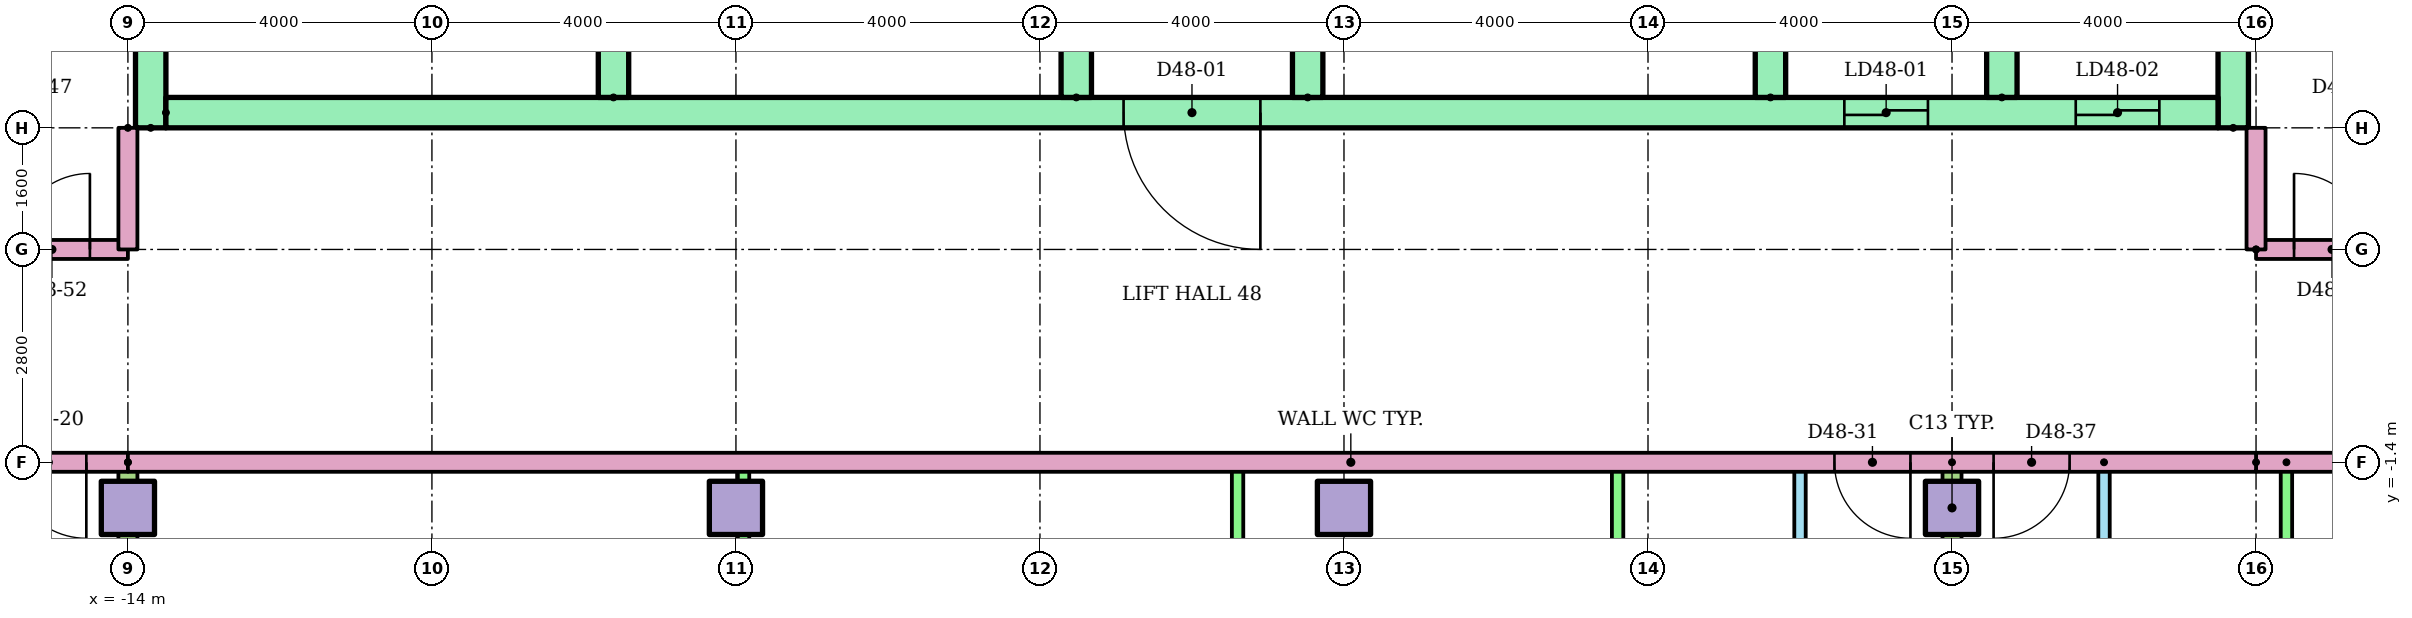
"""IFC4 building model, lengths in metres.
Left out: names, types, materials, properties, quantities, classifications, styles, units other than length and angle.
Written with IfcOpenShell. Run it as: python <this file> out.ifc"""

import sys

from ifc_helpers import new_model, si_unit, direction, frame, frame_2d, origin, origin_2d, place, context, subcontext, project, spatial, rectangle, extrude, element, fill, save


model = new_model("IFC4")
c1 = context("Model", 3, precision=1e-05, world=origin(), true_north=direction((0.0, 1.0)))
c2 = subcontext(c1, "Body", "Model", "MODEL_VIEW")
j1 = project(units=[si_unit("LENGTHUNIT", "METRE"), si_unit("PLANEANGLEUNIT", "RADIAN")], contexts=[c1])
p1 = place(None, origin())
s1 = spatial("IfcSite", under=j1, at=p1, CompositionType="ELEMENT")
p2 = place(p1, origin())
s2 = spatial("IfcBuilding", under=s1, at=p2, CompositionType="ELEMENT")
p3 = place(p2, frame((0.0, 0.0, 184.5)))
s3 = spatial("IfcBuildingStorey", under=s2, at=p3, CompositionType="ELEMENT", Elevation=184.5)
for number, where in (
    (1, (-14.0, -2.0, 0.0)),
    (2, (-6.0, -2.0, 0.0)),
    (3, (2.0, -2.0, 0.0)),
    (4, (10.0, -2.0, 0.0)),
):
    element("IfcColumn", number, at=place(p3, frame(where)), inside=s3, PredefinedType="COLUMN", context=c2, shape_type="SweptSolid", body=[
        extrude(rectangle(XDim=0.7, YDim=0.7, at=origin_2d()), origin(), (0.0, 0.0, 1.0), 3.2),
    ])
for number, where, z_axis, x_axis in (
    (5, (-13.7, 3.0, 0.0), (0.0, 0.0, 1.0), (0.0, 1.0, 0.0)),
    (6, (13.7, 3.0, 0.0), (0.0, 0.0, 1.0), (0.0, 1.0, 0.0)),
):
    element("IfcWall", number, at=place(p3, frame(where, z_axis=z_axis, x_axis=x_axis)), inside=s3, PredefinedType="SHEAR", context=c2, shape_type="SweptSolid", body=[
        extrude(rectangle(XDim=17.0, YDim=0.4, at=frame_2d((8.5, 0.0))), origin(), (0.0, 0.0, 1.0), 2.92),
    ])
p4 = place(p3, frame((-13.5, 3.2, 0.0)))
e7 = element("IfcWall", 7, at=p4, inside=s3, PredefinedType="SHEAR", context=c2, shape_type="SweptSolid", body=[
    extrude(rectangle(XDim=27.0, YDim=0.4, at=frame_2d((13.5, 0.0))), origin(), (0.0, 0.0, 1.0), 2.92),
])
p5 = place(p4, frame((22.083, 0.0, 0.0)))
e8 = element("IfcOpeningElement", 8, at=p5, cuts=e7, PredefinedType="OPENING", context=c2, shape_type="SweptSolid", body=[
    extrude(rectangle(XDim=1.1, YDim=2.1, at=frame_2d((0.55, 1.05))), frame((0.0, 0.21, 0.0), z_axis=(0.0, -1.0, 0.0), x_axis=(1.0, 0.0, 0.0)), (0.0, 0.0, 1.0), 0.42),
])
p6 = place(p4, frame((25.128, 0.0, 0.0)))
e9 = element("IfcOpeningElement", 9, at=p6, cuts=e7, PredefinedType="OPENING", context=c2, shape_type="SweptSolid", body=[
    extrude(rectangle(XDim=1.1, YDim=2.1, at=frame_2d((0.55, 1.05))), frame((0.0, 0.21, 0.0), z_axis=(0.0, -1.0, 0.0), x_axis=(1.0, 0.0, 0.0)), (0.0, 0.0, 1.0), 0.42),
])
p7 = place(p4, frame((12.6, 0.0, 0.0)))
e10 = element("IfcOpeningElement", 10, at=p7, cuts=e7, PredefinedType="OPENING", context=c2, shape_type="SweptSolid", body=[
    extrude(rectangle(XDim=1.8, YDim=2.1, at=frame_2d((0.9, 1.05))), frame((0.0, 0.21, 0.0), z_axis=(0.0, -1.0, 0.0), x_axis=(1.0, 0.0, 0.0)), (0.0, 0.0, 1.0), 0.42),
])
for number, where, z_axis, x_axis in (
    (11, (-7.611, 3.4, 0.0), (0.0, 0.0, 1.0), (0.0, 1.0, 0.0)),
    (12, (-1.522, 3.4, 0.0), (0.0, 0.0, 1.0), (0.0, 1.0, 0.0)),
    (13, (1.522, 3.4, 0.0), (0.0, 0.0, 1.0), (0.0, 1.0, 0.0)),
    (14, (7.611, 3.4, 0.0), (0.0, 0.0, 1.0), (0.0, 1.0, 0.0)),
    (15, (10.656, 3.4, 0.0), (0.0, 0.0, 1.0), (0.0, 1.0, 0.0)),
):
    element("IfcWall", number, at=place(p3, frame(where, z_axis=z_axis, x_axis=x_axis)), inside=s3, PredefinedType="SHEAR", context=c2, shape_type="SweptSolid", body=[
        extrude(rectangle(XDim=3.0, YDim=0.4, at=frame_2d((1.5, 0.0))), origin(), (0.0, 0.0, 1.0), 2.92),
    ])
p8 = place(p3, frame((8.0, -6.9, 0.0), z_axis=(0.0, 0.0, 1.0), x_axis=(0.0, 1.0, 0.0)))
e16 = element("IfcWall", 16, at=p8, inside=s3, PredefinedType="PARTITIONING", context=c2, shape_type="SweptSolid", body=[
    extrude(rectangle(XDim=5.5, YDim=0.15, at=frame_2d((2.75, 0.0))), origin(), (0.0, 0.0, 1.0), 2.4),
])
p9 = place(p8, frame((3.55, 0.0, 0.0)))
e17 = element("IfcOpeningElement", 17, at=p9, cuts=e16, PredefinedType="OPENING", context=c2, shape_type="SweptSolid", body=[
    extrude(rectangle(XDim=0.9, YDim=2.1, at=frame_2d((0.45, 1.05))), frame((0.0, 0.085, 0.0), z_axis=(0.0, -1.0, 0.0), x_axis=(1.0, 0.0, 0.0)), (0.0, 0.0, 1.0), 0.17),
])
p10 = place(p8, frame((0.85, 0.0, 0.0)))
e18 = element("IfcOpeningElement", 18, at=p10, cuts=e16, PredefinedType="OPENING", context=c2, shape_type="SweptSolid", body=[
    extrude(rectangle(XDim=0.8, YDim=2.1, at=frame_2d((0.4, 1.05))), frame((0.0, 0.085, 0.0), z_axis=(0.0, -1.0, 0.0), x_axis=(1.0, 0.0, 0.0)), (0.0, 0.0, 1.0), 0.17),
])
for number, where, z_axis, x_axis in (
    (19, (5.6, -6.9, 0.0), (0.0, 0.0, 1.0), (0.0, 1.0, 0.0)),
    (20, (0.6, -6.9, 0.0), (0.0, 0.0, 1.0), (0.0, 1.0, 0.0)),
    (21, (-5.9, -6.9, 0.0), (0.0, 0.0, 1.0), (0.0, 1.0, 0.0)),
):
    element("IfcWall", number, at=place(p3, frame(where, z_axis=z_axis, x_axis=x_axis)), inside=s3, PredefinedType="PARTITIONING", context=c2, shape_type="SweptSolid", body=[
        extrude(rectangle(XDim=5.5, YDim=0.15, at=frame_2d((2.75, 0.0))), origin(), (0.0, 0.0, 1.0), 2.4),
    ])
p11 = place(p3, frame((-14.0, -1.4, 0.0), z_axis=(0.0, 0.0, 1.0), x_axis=(0.0, -1.0, 0.0)))
e22 = element("IfcWall", 22, at=p11, inside=s3, PredefinedType="PARTITIONING", context=c2, shape_type="SweptSolid", body=[
    extrude(rectangle(XDim=15.01, YDim=0.25, at=frame_2d((7.505, 0.0))), origin(), (0.0, 0.0, 1.0), 2.4),
])
p12 = place(p3, frame((12.0, -1.4, 0.0), z_axis=(0.0, 0.0, 1.0), x_axis=(0.0, -1.0, 0.0)))
e23 = element("IfcWall", 23, at=p12, inside=s3, PredefinedType="PARTITIONING", context=c2, shape_type="SweptSolid", body=[
    extrude(rectangle(XDim=5.5, YDim=0.15, at=frame_2d((2.75, 0.0))), origin(), (0.0, 0.0, 1.0), 2.4),
])
p13 = place(p12, frame((1.05, 0.0, 0.0)))
e24 = element("IfcOpeningElement", 24, at=p13, cuts=e23, PredefinedType="OPENING", context=c2, shape_type="SweptSolid", body=[
    extrude(rectangle(XDim=0.9, YDim=2.1, at=frame_2d((0.45, 1.05))), frame((0.0, 0.085, 0.0), z_axis=(0.0, -1.0, 0.0), x_axis=(1.0, 0.0, 0.0)), (0.0, 0.0, 1.0), 0.17),
])
p14 = place(p12, frame((3.85, 0.0, 0.0)))
e25 = element("IfcOpeningElement", 25, at=p14, cuts=e23, PredefinedType="OPENING", context=c2, shape_type="SweptSolid", body=[
    extrude(rectangle(XDim=0.8, YDim=2.1, at=frame_2d((0.4, 1.05))), frame((0.0, 0.085, 0.0), z_axis=(0.0, -1.0, 0.0), x_axis=(1.0, 0.0, 0.0)), (0.0, 0.0, 1.0), 0.17),
])
p15 = place(p3, frame((14.4, -1.4, 0.0), z_axis=(0.0, 0.0, 1.0), x_axis=(0.0, -1.0, 0.0)))
e26 = element("IfcWall", 26, at=p15, inside=s3, PredefinedType="PARTITIONING", context=c2, shape_type="SweptSolid", body=[
    extrude(rectangle(XDim=5.5, YDim=0.15, at=frame_2d((2.75, 0.0))), origin(), (0.0, 0.0, 1.0), 2.4),
])
p16 = place(p3, frame((10.0, -1.4, 0.0), z_axis=(0.0, 0.0, 1.0), x_axis=(0.0, -1.0, 0.0)))
e27 = element("IfcWall", 27, at=p16, inside=s3, PredefinedType="PARTITIONING", context=c2, shape_type="SweptSolid", body=[
    extrude(rectangle(XDim=15.01, YDim=0.25, at=frame_2d((7.505, 0.0))), origin(), (0.0, 0.0, 1.0), 2.4),
])
p17 = place(p3, frame((-14.0, -1.4, 0.0), z_axis=(0.0, 0.0, 1.0), x_axis=(-1.0, 0.0, 0.0)))
e28 = element("IfcWall", 28, at=p17, inside=s3, PredefinedType="PARTITIONING", context=c2, shape_type="SweptSolid", body=[
    extrude(rectangle(XDim=10.82, YDim=0.25, at=frame_2d((5.41, 0.0))), origin(), (0.0, 0.0, 1.0), 2.4),
])
p18 = place(p17, frame((0.547, 0.0, 0.0)))
e29 = element("IfcOpeningElement", 29, at=p18, cuts=e28, PredefinedType="OPENING", context=c2, shape_type="SweptSolid", body=[
    extrude(rectangle(XDim=1.0, YDim=2.1, at=frame_2d((0.5, 1.05))), frame((0.0, 0.135, 0.0), z_axis=(0.0, -1.0, 0.0), x_axis=(1.0, 0.0, 0.0)), (0.0, 0.0, 1.0), 0.27),
])
p19 = place(p3, frame((29.0, -1.4, 0.0), z_axis=(0.0, 0.0, 1.0), x_axis=(-1.0, 0.0, 0.0)))
e30 = element("IfcWall", 30, at=p19, inside=s3, PredefinedType="PARTITIONING", context=c2, shape_type="SweptSolid", body=[
    extrude(rectangle(XDim=15.0, YDim=0.25, at=frame_2d((7.5, 0.0))), origin(), (0.0, 0.0, 1.0), 2.4),
])
p20 = place(p19, frame((9.453, 0.0, 0.0)))
e31 = element("IfcOpeningElement", 31, at=p20, cuts=e30, PredefinedType="OPENING", context=c2, shape_type="SweptSolid", body=[
    extrude(rectangle(XDim=1.0, YDim=2.1, at=frame_2d((0.5, 1.05))), frame((0.0, 0.135, 0.0), z_axis=(0.0, -1.0, 0.0), x_axis=(1.0, 0.0, 0.0)), (0.0, 0.0, 1.0), 0.27),
])
p21 = place(p3, frame((-24.82, 1.4, 0.0)))
e32 = element("IfcWall", 32, at=p21, inside=s3, PredefinedType="PARTITIONING", context=c2, shape_type="SweptSolid", body=[
    extrude(rectangle(XDim=10.82, YDim=0.25, at=frame_2d((5.41, 0.0))), origin(), (0.0, 0.0, 1.0), 2.4),
])
p22 = place(p21, frame((9.32, 0.0, 0.0)))
e33 = element("IfcOpeningElement", 33, at=p22, cuts=e32, PredefinedType="OPENING", context=c2, shape_type="SweptSolid", body=[
    extrude(rectangle(XDim=1.0, YDim=2.1, at=frame_2d((0.5, 1.05))), frame((0.0, 0.135, 0.0), z_axis=(0.0, -1.0, 0.0), x_axis=(1.0, 0.0, 0.0)), (0.0, 0.0, 1.0), 0.27),
])
p23 = place(p3, frame((14.0, 1.4, 0.0)))
e34 = element("IfcWall", 34, at=p23, inside=s3, PredefinedType="PARTITIONING", context=c2, shape_type="SweptSolid", body=[
    extrude(rectangle(XDim=15.0, YDim=0.25, at=frame_2d((7.5, 0.0))), origin(), (0.0, 0.0, 1.0), 2.4),
])
p24 = place(p23, frame((0.5, 0.0, 0.0)))
e35 = element("IfcOpeningElement", 35, at=p24, cuts=e34, PredefinedType="OPENING", context=c2, shape_type="SweptSolid", body=[
    extrude(rectangle(XDim=1.0, YDim=2.1, at=frame_2d((0.5, 1.05))), frame((0.0, 0.135, 0.0), z_axis=(0.0, -1.0, 0.0), x_axis=(1.0, 0.0, 0.0)), (0.0, 0.0, 1.0), 0.27),
])
p25 = place(p23, frame((12.547, 0.0, 0.0)))
e36 = element("IfcOpeningElement", 36, at=p25, cuts=e34, PredefinedType="OPENING", context=c2, shape_type="SweptSolid", body=[
    extrude(rectangle(XDim=1.0, YDim=2.1, at=frame_2d((0.5, 1.05))), frame((0.0, 0.135, 0.0), z_axis=(0.0, -1.0, 0.0), x_axis=(1.0, 0.0, 0.0)), (0.0, 0.0, 1.0), 0.27),
])
p26 = place(p3, frame((14.0, -1.4, 0.0), z_axis=(0.0, 0.0, 1.0), x_axis=(-1.0, 0.0, 0.0)))
e37 = element("IfcWall", 37, at=p26, inside=s3, PredefinedType="PARTITIONING", context=c2, shape_type="SweptSolid", body=[
    extrude(rectangle(XDim=28.0, YDim=0.25, at=frame_2d((14.0, 0.0))), origin(), (0.0, 0.0, 1.0), 2.4),
])
p27 = place(p26, frame((4.547, 0.0, 0.0)))
e38 = element("IfcOpeningElement", 38, at=p27, cuts=e37, PredefinedType="OPENING", context=c2, shape_type="SweptSolid", body=[
    extrude(rectangle(XDim=1.0, YDim=2.1, at=frame_2d((0.5, 1.05))), frame((0.0, 0.135, 0.0), z_axis=(0.0, -1.0, 0.0), x_axis=(1.0, 0.0, 0.0)), (0.0, 0.0, 1.0), 0.27),
])
p28 = place(p26, frame((2.453, 0.0, 0.0)))
e39 = element("IfcOpeningElement", 39, at=p28, cuts=e37, PredefinedType="OPENING", context=c2, shape_type="SweptSolid", body=[
    extrude(rectangle(XDim=1.0, YDim=2.1, at=frame_2d((0.5, 1.05))), frame((0.0, 0.135, 0.0), z_axis=(0.0, -1.0, 0.0), x_axis=(1.0, 0.0, 0.0)), (0.0, 0.0, 1.0), 0.27),
])
for number, where, z_axis, x_axis in (
    (40, (-14.0, 3.0, 0.0), (0.0, 0.0, 1.0), (0.0, -1.0, 0.0)),
    (41, (14.0, 1.4, 0.0), (0.0, 0.0, 1.0), (0.0, 1.0, 0.0)),
):
    element("IfcWall", number, at=place(p3, frame(where, z_axis=z_axis, x_axis=x_axis)), inside=s3, PredefinedType="PARTITIONING", context=c2, shape_type="SweptSolid", body=[
        extrude(rectangle(XDim=1.6, YDim=0.25, at=frame_2d((0.8, 0.0))), origin(), (0.0, 0.0, 1.0), 2.4),
    ])
p29 = place(p5, origin())
e42 = element("IfcDoor", 42, at=p29, inside=s3, OperationType="SLIDING_TO_LEFT", PredefinedType="DOOR", context=c2, shape_type="SweptSolid", body=[
    extrude(rectangle(XDim=1.1, YDim=2.1, at=frame_2d((0.55, 1.05))), frame((0.0, 0.025, 0.0), z_axis=(0.0, -1.0, 0.0), x_axis=(1.0, 0.0, 0.0)), (0.0, 0.0, 1.0), 0.05),
])
fill(e8, e42)
p30 = place(p6, origin())
e43 = element("IfcDoor", 43, at=p30, inside=s3, OperationType="SLIDING_TO_LEFT", PredefinedType="DOOR", context=c2, shape_type="SweptSolid", body=[
    extrude(rectangle(XDim=1.1, YDim=2.1, at=frame_2d((0.55, 1.05))), frame((0.0, 0.025, 0.0), z_axis=(0.0, -1.0, 0.0), x_axis=(1.0, 0.0, 0.0)), (0.0, 0.0, 1.0), 0.05),
])
fill(e9, e43)
p31 = place(p7, frame((1.8, 0.0, 0.0), z_axis=(0.0, 0.0, 1.0), x_axis=(-1.0, 0.0, 0.0)))
e44 = element("IfcDoor", 44, at=p31, inside=s3, OperationType="DOUBLE_DOOR_SINGLE_SWING", PredefinedType="DOOR", context=c2, shape_type="SweptSolid", body=[
    extrude(rectangle(XDim=1.8, YDim=2.1, at=frame_2d((0.9, 1.05))), frame((0.0, 0.025, 0.0), z_axis=(0.0, -1.0, 0.0), x_axis=(1.0, 0.0, 0.0)), (0.0, 0.0, 1.0), 0.05),
])
fill(e10, e44)
p32 = place(p18, origin())
e45 = element("IfcDoor", 45, at=p32, inside=s3, OperationType="SINGLE_SWING_LEFT", PredefinedType="DOOR", context=c2, shape_type="SweptSolid", body=[
    extrude(rectangle(XDim=1.0, YDim=2.1, at=frame_2d((0.5, 1.05))), frame((0.0, 0.025, 0.0), z_axis=(0.0, -1.0, 0.0), x_axis=(1.0, 0.0, 0.0)), (0.0, 0.0, 1.0), 0.05),
])
fill(e29, e45)
p33 = place(p27, origin())
e46 = element("IfcDoor", 46, at=p33, inside=s3, OperationType="SINGLE_SWING_LEFT", PredefinedType="DOOR", context=c2, shape_type="SweptSolid", body=[
    extrude(rectangle(XDim=1.0, YDim=2.1, at=frame_2d((0.5, 1.05))), frame((0.0, 0.025, 0.0), z_axis=(0.0, -1.0, 0.0), x_axis=(1.0, 0.0, 0.0)), (0.0, 0.0, 1.0), 0.05),
])
fill(e38, e46)
p34 = place(p28, origin())
e47 = element("IfcDoor", 47, at=p34, inside=s3, OperationType="SINGLE_SWING_RIGHT", PredefinedType="DOOR", context=c2, shape_type="SweptSolid", body=[
    extrude(rectangle(XDim=1.0, YDim=2.1, at=frame_2d((0.5, 1.05))), frame((0.0, 0.025, 0.0), z_axis=(0.0, -1.0, 0.0), x_axis=(1.0, 0.0, 0.0)), (0.0, 0.0, 1.0), 0.05),
])
fill(e39, e47)
p35 = place(p22, origin())
e48 = element("IfcDoor", 48, at=p35, inside=s3, OperationType="SINGLE_SWING_RIGHT", PredefinedType="DOOR", context=c2, shape_type="SweptSolid", body=[
    extrude(rectangle(XDim=1.0, YDim=2.1, at=frame_2d((0.5, 1.05))), frame((0.0, 0.025, 0.0), z_axis=(0.0, -1.0, 0.0), x_axis=(1.0, 0.0, 0.0)), (0.0, 0.0, 1.0), 0.05),
])
fill(e33, e48)
p36 = place(p24, origin())
e49 = element("IfcDoor", 49, at=p36, inside=s3, OperationType="SINGLE_SWING_LEFT", PredefinedType="DOOR", context=c2, shape_type="SweptSolid", body=[
    extrude(rectangle(XDim=1.0, YDim=2.1, at=frame_2d((0.5, 1.05))), frame((0.0, 0.025, 0.0), z_axis=(0.0, -1.0, 0.0), x_axis=(1.0, 0.0, 0.0)), (0.0, 0.0, 1.0), 0.05),
])
fill(e35, e49)
save(model, sys.argv[1])
